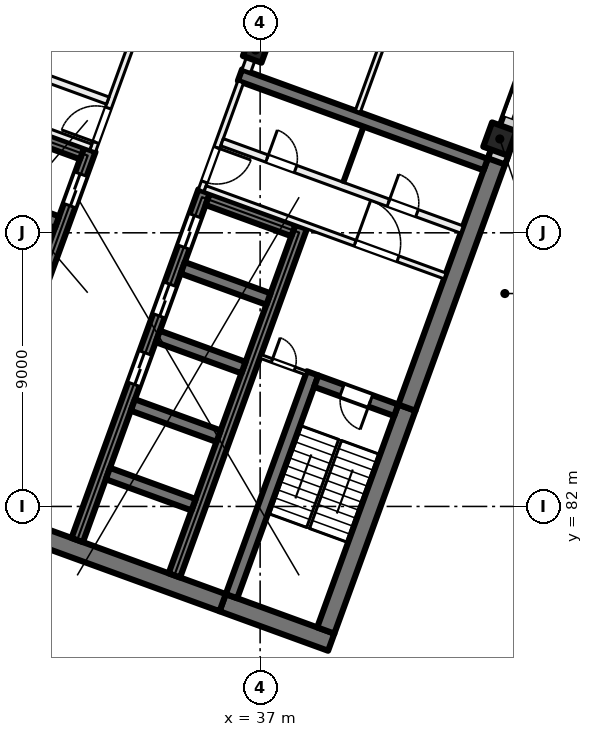
"""IFC4 building model, lengths in metres.
Left out: names, types, materials, properties, quantities, classifications, styles, units other than length and angle.
Written with IfcOpenShell. Run it as: python <this file> out.ifc"""

import sys

from ifc_helpers import new_model, si_unit, direction, frame, frame_2d, origin, origin_2d, place, context, subcontext, project, spatial, rectangle, extrude, element, fill, save


model = new_model("IFC4")
c1 = context("Model", 3, precision=1e-05, world=origin(), true_north=direction((0.0, 1.0)))
c2 = subcontext(c1, "Body", "Model", "MODEL_VIEW")
j1 = project(units=[si_unit("LENGTHUNIT", "METRE"), si_unit("PLANEANGLEUNIT", "RADIAN")], contexts=[c1])
p1 = place(None, origin())
s1 = spatial("IfcSite", under=j1, at=p1, CompositionType="ELEMENT")
p2 = place(p1, origin())
s2 = spatial("IfcBuilding", under=s1, at=p2, CompositionType="ELEMENT")
p3 = place(p2, frame((0.0, 0.0, 81.0)))
s3 = spatial("IfcBuildingStorey", under=s2, at=p3, CompositionType="ELEMENT", Elevation=81.0)
p4 = place(p3, frame((36.849, 97.011, 0.0), z_axis=(0.0, 0.0, 1.0), x_axis=(-0.342020143326, -0.939692620786, 0.0)))
e1 = element("IfcColumn", 1, at=p4, inside=s3, PredefinedType="COLUMN", context=c2, shape_type="SweptSolid", body=[
    extrude(rectangle(XDim=0.65, YDim=0.65, at=origin_2d()), origin(), (0.0, 0.0, 1.0), 4.0),
])
p5 = place(p3, frame((44.884, 94.087, 0.0), z_axis=(0.0, 0.0, 1.0), x_axis=(-0.342020143326, -0.939692620786, 0.0)))
e2 = element("IfcColumn", 2, at=p5, inside=s3, PredefinedType="COLUMN", context=c2, shape_type="SweptSolid", body=[
    extrude(rectangle(XDim=0.85, YDim=0.85, at=origin_2d()), origin(), (0.0, 0.0, 1.0), 4.0),
])
p6 = place(p3, frame((39.338, 77.535, 0.0), z_axis=(0.0, 0.0, 1.0), x_axis=(-0.939701471648, 0.341995824804, 0.0)))
e3 = element("IfcWall", 3, at=p6, inside=s3, PredefinedType="SHEAR", context=c2, shape_type="SweptSolid", body=[
    extrude(rectangle(XDim=3.8, YDim=0.6, at=frame_2d((1.9, 0.0))), origin(), (0.0, 0.0, 1.0), 4.0),
])
p7 = place(p3, frame((35.767, 78.835, 0.0), z_axis=(0.0, 0.0, 1.0), x_axis=(-0.939692894512, 0.342019391267, 0.0)))
e4 = element("IfcWall", 4, at=p7, inside=s3, PredefinedType="SHEAR", context=c2, shape_type="SweptSolid", body=[
    extrude(rectangle(XDim=14.4, YDim=0.6, at=frame_2d((7.2, 0.0))), origin(), (0.0, 0.0, 1.0), 4.0),
])
p8 = place(p3, frame((39.159, 77.92, 0.0), z_axis=(0.0, 0.0, 1.0), x_axis=(0.342016982193, 0.939693771338, 0.0)))
e5 = element("IfcWall", 5, at=p8, inside=s3, PredefinedType="SHEAR", context=c2, shape_type="SweptSolid", body=[
    extrude(rectangle(XDim=7.8, YDim=0.6, at=frame_2d((3.9, 0.0))), origin(), (0.0, 0.0, 1.0), 4.0),
])
p9 = place(p3, frame((41.827, 85.249, 0.0), z_axis=(0.0, 0.0, 1.0), x_axis=(0.342017595281, 0.939693548195, 0.0)))
e6 = element("IfcWall", 6, at=p9, inside=s3, PredefinedType="SHEAR", context=c2, shape_type="SweptSolid", body=[
    extrude(rectangle(XDim=8.925, YDim=0.6, at=frame_2d((4.462, 0.0))), origin(), (0.0, 0.0, 1.0), 4.0),
])
p10 = place(p3, frame((36.058, 79.048, 0.0), z_axis=(0.0, 0.0, 1.0), x_axis=(0.342016982193, 0.939693771338, 0.0)))
e7 = element("IfcWall", 7, at=p10, inside=s3, PredefinedType="SHEAR", context=c2, shape_type="SweptSolid", body=[
    extrude(rectangle(XDim=7.8, YDim=0.4, at=frame_2d((3.9, 0.0))), origin(), (0.0, 0.0, 1.0), 4.0),
])
p11 = place(p3, frame((41.476, 85.164, 0.0), z_axis=(0.0, 0.0, 1.0), x_axis=(-0.939678810556, 0.342058084236, 0.0)))
e8 = element("IfcWall", 8, at=p11, inside=s3, PredefinedType="SHEAR", context=c2, shape_type="SweptSolid", body=[
    extrude(rectangle(XDim=2.8, YDim=0.4, at=frame_2d((1.4, 0.0))), origin(), (0.0, 0.0, 1.0), 4.0),
])
p12 = place(p11, frame((0.9, 0.0, 0.0)))
e9 = element("IfcOpeningElement", 9, at=p12, cuts=e8, PredefinedType="OPENING", context=c2, shape_type="SweptSolid", body=[
    extrude(rectangle(XDim=1.0, YDim=2.1, at=frame_2d((0.5, 1.05))), frame((0.0, 0.21, 0.0), z_axis=(0.0, -1.0, 0.0), x_axis=(1.0, 0.0, 0.0)), (0.0, 0.0, 1.0), 0.42),
])
p13 = place(p3, frame((30.984, 80.895, 0.0), z_axis=(0.0, 0.0, 1.0), x_axis=(0.342021021735, 0.939692301071, 0.0)))
e10 = element("IfcWall", 10, at=p13, inside=s3, PredefinedType="SHEAR", context=c2, shape_type="SweptSolid", body=[
    extrude(rectangle(XDim=12.2, YDim=0.4, at=frame_2d((6.1, 0.0))), origin(), (0.0, 0.0, 1.0), 4.0),
])
p14 = place(p13, frame((5.45, 0.0, 0.0)))
e11 = element("IfcOpeningElement", 11, at=p14, cuts=e10, PredefinedType="OPENING", context=c2, shape_type="SweptSolid", body=[
    extrude(rectangle(XDim=1.1, YDim=2.1, at=frame_2d((0.55, 1.05))), frame((0.0, 0.21, 0.0), z_axis=(0.0, -1.0, 0.0), x_axis=(1.0, 0.0, 0.0)), (0.0, 0.0, 1.0), 0.42),
])
p15 = place(p13, frame((7.85, 0.0, 0.0)))
e12 = element("IfcOpeningElement", 12, at=p15, cuts=e10, PredefinedType="OPENING", context=c2, shape_type="SweptSolid", body=[
    extrude(rectangle(XDim=1.1, YDim=2.1, at=frame_2d((0.55, 1.05))), frame((0.0, 0.21, 0.0), z_axis=(0.0, -1.0, 0.0), x_axis=(1.0, 0.0, 0.0)), (0.0, 0.0, 1.0), 0.42),
])
p16 = place(p13, frame((10.25, 0.0, 0.0)))
e13 = element("IfcOpeningElement", 13, at=p16, cuts=e10, PredefinedType="OPENING", context=c2, shape_type="SweptSolid", body=[
    extrude(rectangle(XDim=1.1, YDim=2.1, at=frame_2d((0.55, 1.05))), frame((0.0, 0.21, 0.0), z_axis=(0.0, -1.0, 0.0), x_axis=(1.0, 0.0, 0.0)), (0.0, 0.0, 1.0), 0.42),
])
p17 = place(p3, frame((34.178, 79.732, 0.0), z_axis=(0.0, 0.0, 1.0), x_axis=(0.342014590177, 0.939694641948, 0.0)))
e14 = element("IfcWall", 14, at=p17, inside=s3, PredefinedType="SHEAR", context=c2, shape_type="SweptSolid", body=[
    extrude(rectangle(XDim=12.2, YDim=0.4, at=frame_2d((6.1, 0.0))), origin(), (0.0, 0.0, 1.0), 4.0),
])
for number, where, z_axis, x_axis in (
    (15, (34.812, 82.056, 0.0), (0.0, 0.0, 1.0), (-0.94, 0.342, 0.0)),
    (16, (35.632, 84.311, 0.0), (0.0, 0.0, 1.0), (-0.94, 0.342, 0.0)),
    (17, (36.453, 86.566, 0.0), (0.0, 0.0, 1.0), (-0.94, 0.342, 0.0)),
    (18, (37.274, 88.822, 0.0), (0.0, 0.0, 1.0), (-0.94, 0.342, 0.0)),
):
    element("IfcWall", number, at=place(p3, frame(where, z_axis=z_axis, x_axis=x_axis)), inside=s3, PredefinedType="SHEAR", context=c2, shape_type="SweptSolid", body=[
        extrude(rectangle(XDim=3.0, YDim=0.4, at=frame_2d((1.5, 0.0))), origin(), (0.0, 0.0, 1.0), 4.0),
    ])
p18 = place(p3, frame((38.095, 91.077, 0.0), z_axis=(0.0, 0.0, 1.0), x_axis=(-0.939676934218, 0.342063238742, 0.0)))
e19 = element("IfcWall", 19, at=p18, inside=s3, PredefinedType="SHEAR", context=c2, shape_type="SweptSolid", body=[
    extrude(rectangle(XDim=3.0, YDim=0.4, at=frame_2d((1.5, 0.0))), origin(), (0.0, 0.0, 1.0), 4.0),
])
p19 = place(p3, frame((27.225, 82.263, 0.0), z_axis=(0.0, 0.0, 1.0), x_axis=(0.342014590177, 0.939694641948, 0.0)))
e20 = element("IfcWall", 20, at=p19, inside=s3, PredefinedType="SHEAR", context=c2, shape_type="SweptSolid", body=[
    extrude(rectangle(XDim=12.2, YDim=0.4, at=frame_2d((6.1, 0.0))), origin(), (0.0, 0.0, 1.0), 4.0),
])
p20 = place(p19, frame((10.25, 0.0, 0.0)))
e21 = element("IfcOpeningElement", 21, at=p20, cuts=e20, PredefinedType="OPENING", context=c2, shape_type="SweptSolid", body=[
    extrude(rectangle(XDim=1.1, YDim=2.1, at=frame_2d((0.55, 1.05))), frame((0.0, 0.21, 0.0), z_axis=(0.0, -1.0, 0.0), x_axis=(1.0, 0.0, 0.0)), (0.0, 0.0, 1.0), 0.42),
])
p21 = place(p19, frame((0.7, 0.0, 0.0)))
e22 = element("IfcOpeningElement", 22, at=p21, cuts=e20, PredefinedType="OPENING", context=c2, shape_type="SweptSolid", body=[
    extrude(rectangle(XDim=0.8, YDim=2.1, at=frame_2d((0.4, 1.05))), frame((0.0, 0.21, 0.0), z_axis=(0.0, -1.0, 0.0), x_axis=(1.0, 0.0, 0.0)), (0.0, 0.0, 1.0), 0.42),
])
for number, where, z_axis, x_axis in (
    (23, (30.32, 91.353, 0.0), (0.0, 0.0, 1.0), (-0.94, 0.342, 0.0)),
    (24, (31.141, 93.608, 0.0), (0.0, 0.0, 1.0), (-0.94, 0.342, 0.0)),
):
    element("IfcWall", number, at=place(p3, frame(where, z_axis=z_axis, x_axis=x_axis)), inside=s3, PredefinedType="SHEAR", context=c2, shape_type="SweptSolid", body=[
        extrude(rectangle(XDim=3.0, YDim=0.4, at=frame_2d((1.5, 0.0))), origin(), (0.0, 0.0, 1.0), 4.0),
    ])
p22 = place(p3, frame((44.418, 93.245, 0.0), z_axis=(0.0, 0.0, 1.0), x_axis=(-0.93969060187, 0.342025690201, 0.0)))
e25 = element("IfcWall", 25, at=p22, inside=s3, PredefinedType="SHEAR", context=c2, shape_type="SweptSolid", body=[
    extrude(rectangle(XDim=8.6, YDim=0.4, at=frame_2d((4.3, 0.0))), origin(), (0.0, 0.0, 1.0), 4.0),
])
p23 = place(p3, frame((52.212, 113.783, 0.0), z_axis=(0.0, 0.0, 1.0), x_axis=(-0.34202521188, -0.939690775968, 0.0)))
e26 = element("IfcWall", 26, at=p23, inside=s3, PredefinedType="SOLIDWALL", context=c2, shape_type="SweptSolid", body=[
    extrude(rectangle(XDim=21.745, YDim=0.6, at=frame_2d((10.873, 0.0))), origin(), (0.0, 0.0, 1.0), 3.625),
])
p24 = place(p23, frame((4.365, 0.0, 0.0)))
e27 = element("IfcOpeningElement", 27, at=p24, cuts=e26, PredefinedType="OPENING", context=c2, shape_type="SweptSolid", body=[
    extrude(rectangle(XDim=1.8, YDim=2.4, at=frame_2d((0.9, 1.2))), frame((0.0, 0.31, 0.0), z_axis=(0.0, -1.0, 0.0), x_axis=(1.0, 0.0, 0.0)), (0.0, 0.0, 1.0), 0.62),
])
p25 = place(p23, frame((8.265, 0.0, 0.9)))
e28 = element("IfcOpeningElement", 28, at=p25, cuts=e26, PredefinedType="OPENING", context=c2, shape_type="SweptSolid", body=[
    extrude(rectangle(XDim=3.0, YDim=2.4, at=frame_2d((1.5, 1.2))), frame((0.0, 0.31, 0.0), z_axis=(0.0, -1.0, 0.0), x_axis=(1.0, 0.0, 0.0)), (0.0, 0.0, 1.0), 0.62),
])
p26 = place(p23, frame((12.765, 0.0, 0.9)))
e29 = element("IfcOpeningElement", 29, at=p26, cuts=e26, PredefinedType="OPENING", context=c2, shape_type="SweptSolid", body=[
    extrude(rectangle(XDim=3.0, YDim=2.4, at=frame_2d((1.5, 1.2))), frame((0.0, 0.31, 0.0), z_axis=(0.0, -1.0, 0.0), x_axis=(1.0, 0.0, 0.0)), (0.0, 0.0, 1.0), 0.62),
])
p27 = place(p23, frame((17.265, 0.0, 0.9)))
e30 = element("IfcOpeningElement", 30, at=p27, cuts=e26, PredefinedType="OPENING", context=c2, shape_type="SweptSolid", body=[
    extrude(rectangle(XDim=3.0, YDim=2.4, at=frame_2d((1.5, 1.2))), frame((0.0, 0.31, 0.0), z_axis=(0.0, -1.0, 0.0), x_axis=(1.0, 0.0, 0.0)), (0.0, 0.0, 1.0), 0.62),
])
p28 = place(p3, frame((31.491, 93.693, 0.0), z_axis=(0.0, 0.0, 1.0), x_axis=(0.341995824804, 0.939701471648, 0.0)))
e31 = element("IfcWall", 31, at=p28, inside=s3, PredefinedType="PARTITIONING", context=c2, shape_type="SweptSolid", body=[
    extrude(rectangle(XDim=3.8, YDim=0.2, at=frame_2d((1.9, 0.0))), origin(), (0.0, 0.0, 1.0), 3.625),
])
p29 = place(p28, frame((0.3, 0.0, 0.0)))
e32 = element("IfcOpeningElement", 32, at=p29, cuts=e31, PredefinedType="OPENING", context=c2, shape_type="SweptSolid", body=[
    extrude(rectangle(XDim=1.2, YDim=2.1, at=frame_2d((0.6, 1.05))), frame((0.0, 0.11, 0.0), z_axis=(0.0, -1.0, 0.0), x_axis=(1.0, 0.0, 0.0)), (0.0, 0.0, 1.0), 0.22),
])
p30 = place(p3, frame((23.538, 96.694, 0.0), z_axis=(0.0, 0.0, 1.0), x_axis=(0.939691552312, -0.342023078919, 0.0)))
e33 = element("IfcWall", 33, at=p30, inside=s3, PredefinedType="PARTITIONING", context=c2, shape_type="SweptSolid", body=[
    extrude(rectangle(XDim=8.4, YDim=0.2, at=frame_2d((4.2, 0.0))), origin(), (0.0, 0.0, 1.0), 3.625),
])
p31 = place(p30, frame((1.65, 0.0, 0.0)))
e34 = element("IfcOpeningElement", 34, at=p31, cuts=e33, PredefinedType="OPENING", context=c2, shape_type="SweptSolid", body=[
    extrude(rectangle(XDim=1.5, YDim=2.1, at=frame_2d((0.75, 1.05))), frame((0.0, 0.11, 0.0), z_axis=(0.0, -1.0, 0.0), x_axis=(1.0, 0.0, 0.0)), (0.0, 0.0, 1.0), 0.22),
])
p32 = place(p3, frame((24.094, 98.221, 0.0), z_axis=(0.0, 0.0, 1.0), x_axis=(0.939691552312, -0.342023078919, 0.0)))
e35 = element("IfcWall", 35, at=p32, inside=s3, PredefinedType="PARTITIONING", context=c2, shape_type="SweptSolid", body=[
    extrude(rectangle(XDim=8.4, YDim=0.25, at=frame_2d((4.2, 0.0))), origin(), (0.0, 0.0, 1.0), 3.625),
])
p33 = place(p32, frame((5.225, 0.0, 0.0)))
e36 = element("IfcOpeningElement", 36, at=p33, cuts=e35, PredefinedType="OPENING", context=c2, shape_type="SweptSolid", body=[
    extrude(rectangle(XDim=0.8, YDim=2.1, at=frame_2d((0.4, 1.05))), frame((0.0, 0.135, 0.0), z_axis=(0.0, -1.0, 0.0), x_axis=(1.0, 0.0, 0.0)), (0.0, 0.0, 1.0), 0.27),
])
p34 = place(p32, frame((0.975, 0.0, 0.0)))
e37 = element("IfcOpeningElement", 37, at=p34, cuts=e35, PredefinedType="OPENING", context=c2, shape_type="SweptSolid", body=[
    extrude(rectangle(XDim=0.8, YDim=2.1, at=frame_2d((0.4, 1.05))), frame((0.0, 0.135, 0.0), z_axis=(0.0, -1.0, 0.0), x_axis=(1.0, 0.0, 0.0)), (0.0, 0.0, 1.0), 0.27),
])
p35 = place(p3, frame((36.362, 95.964, 0.0), z_axis=(0.0, 0.0, 1.0), x_axis=(-0.341995824804, -0.939701471648, 0.0)))
e38 = element("IfcWall", 38, at=p35, inside=s3, PredefinedType="PARTITIONING", context=c2, shape_type="SweptSolid", body=[
    extrude(rectangle(XDim=3.8, YDim=0.2, at=frame_2d((1.9, 0.0))), origin(), (0.0, 0.0, 1.0), 3.625),
])
p36 = place(p35, frame((2.3, 0.0, 0.0)))
e39 = element("IfcOpeningElement", 39, at=p36, cuts=e38, PredefinedType="OPENING", context=c2, shape_type="SweptSolid", body=[
    extrude(rectangle(XDim=1.2, YDim=2.1, at=frame_2d((0.6, 1.05))), frame((0.0, 0.11, 0.0), z_axis=(0.0, -1.0, 0.0), x_axis=(1.0, 0.0, 0.0)), (0.0, 0.0, 1.0), 0.22),
])
p37 = place(p3, frame((35.19, 92.453, 0.0), z_axis=(0.0, 0.0, 1.0), x_axis=(0.939691552312, -0.342023078919, 0.0)))
e40 = element("IfcWall", 40, at=p37, inside=s3, PredefinedType="PARTITIONING", context=c2, shape_type="SweptSolid", body=[
    extrude(rectangle(XDim=8.4, YDim=0.2, at=frame_2d((4.2, 0.0))), origin(), (0.0, 0.0, 1.0), 3.625),
])
p38 = place(p37, frame((5.25, 0.0, 0.0)))
e41 = element("IfcOpeningElement", 41, at=p38, cuts=e40, PredefinedType="OPENING", context=c2, shape_type="SweptSolid", body=[
    extrude(rectangle(XDim=1.5, YDim=2.1, at=frame_2d((0.75, 1.05))), frame((0.0, 0.11, 0.0), z_axis=(0.0, -1.0, 0.0), x_axis=(1.0, 0.0, 0.0)), (0.0, 0.0, 1.0), 0.22),
])
p39 = place(p3, frame((35.746, 93.98, 0.0), z_axis=(0.0, 0.0, 1.0), x_axis=(0.939691552312, -0.342023078919, 0.0)))
e42 = element("IfcWall", 42, at=p39, inside=s3, PredefinedType="PARTITIONING", context=c2, shape_type="SweptSolid", body=[
    extrude(rectangle(XDim=8.4, YDim=0.25, at=frame_2d((4.2, 0.0))), origin(), (0.0, 0.0, 1.0), 3.625),
])
p40 = place(p39, frame((1.575, 0.0, 0.0)))
e43 = element("IfcOpeningElement", 43, at=p40, cuts=e42, PredefinedType="OPENING", context=c2, shape_type="SweptSolid", body=[
    extrude(rectangle(XDim=1.0, YDim=2.1, at=frame_2d((0.5, 1.05))), frame((0.0, 0.135, 0.0), z_axis=(0.0, -1.0, 0.0), x_axis=(1.0, 0.0, 0.0)), (0.0, 0.0, 1.0), 0.27),
])
p41 = place(p39, frame((5.825, 0.0, 0.0)))
e44 = element("IfcOpeningElement", 44, at=p41, cuts=e42, PredefinedType="OPENING", context=c2, shape_type="SweptSolid", body=[
    extrude(rectangle(XDim=1.0, YDim=2.1, at=frame_2d((0.5, 1.05))), frame((0.0, 0.135, 0.0), z_axis=(0.0, -1.0, 0.0), x_axis=(1.0, 0.0, 0.0)), (0.0, 0.0, 1.0), 0.27),
])
p42 = place(p3, frame((37.013, 86.935, 0.0), z_axis=(0.0, 0.0, 1.0), x_axis=(0.939659694648, -0.342110593602, 0.0)))
e45 = element("IfcWall", 45, at=p42, inside=s3, PredefinedType="PARTITIONING", context=c2, shape_type="SweptSolid", body=[
    extrude(rectangle(XDim=1.6, YDim=0.125, at=frame_2d((0.8, 0.0))), origin(), (0.0, 0.0, 1.0), 3.625),
])
p43 = place(p42, frame((0.4, 0.0, 0.0)))
e46 = element("IfcOpeningElement", 46, at=p43, cuts=e45, PredefinedType="OPENING", context=c2, shape_type="SweptSolid", body=[
    extrude(rectangle(XDim=0.8, YDim=2.1, at=frame_2d((0.4, 1.05))), frame((0.0, 0.073, 0.0), z_axis=(0.0, -1.0, 0.0), x_axis=(1.0, 0.0, 0.0)), (0.0, 0.0, 1.0), 0.145),
])
p44 = place(p3, frame((40.403, 94.494, 0.0), z_axis=(0.0, 0.0, 1.0), x_axis=(-0.342064742067, -0.939676386973, 0.0)))
e47 = element("IfcWall", 47, at=p44, inside=s3, PredefinedType="PARTITIONING", context=c2, shape_type="SweptSolid", body=[
    extrude(rectangle(XDim=1.95, YDim=0.1, at=frame_2d((0.975, 0.0))), origin(), (0.0, 0.0, 1.0), 3.625),
])
p45 = place(p3, frame((42.036, 100.005, 0.0), z_axis=(0.0, 0.0, 1.0), x_axis=(-0.341908323648, -0.939733312286, 0.0)))
e48 = element("IfcWall", 48, at=p45, inside=s3, PredefinedType="PARTITIONING", context=c2, shape_type="SweptSolid", body=[
    extrude(rectangle(XDim=5.338, YDim=0.175, at=frame_2d((2.669, 0.0))), origin(), (0.0, 0.0, 1.0), 3.625),
])
p46 = place(p3, frame((47.314, 125.909, 0.0), z_axis=(0.0, 0.0, 1.0), x_axis=(-0.342010770371, -0.939696032209, 0.0)))
e49 = element("IfcWall", 49, at=p46, inside=s3, PredefinedType="PARTITIONING", context=c2, shape_type="SweptSolid", body=[
    extrude(rectangle(XDim=31.485, YDim=0.3, at=frame_2d((15.742, 0.0))), origin(), (0.0, 0.0, 1.0), 3.625),
])
p47 = place(p46, frame((28.259, 0.0, 0.0)))
e50 = element("IfcOpeningElement", 50, at=p47, cuts=e49, PredefinedType="OPENING", context=c2, shape_type="SweptSolid", body=[
    extrude(rectangle(XDim=1.2, YDim=2.1, at=frame_2d((0.6, 1.05))), frame((0.0, 0.16, 0.0), z_axis=(0.0, -1.0, 0.0), x_axis=(1.0, 0.0, 0.0)), (0.0, 0.0, 1.0), 0.32),
])
p48 = place(p46, frame((18.584, 0.0, 0.0)))
e51 = element("IfcOpeningElement", 51, at=p48, cuts=e49, PredefinedType="OPENING", context=c2, shape_type="SweptSolid", body=[
    extrude(rectangle(XDim=1.8, YDim=2.1, at=frame_2d((0.9, 1.05))), frame((0.0, 0.16, 0.0), z_axis=(0.0, -1.0, 0.0), x_axis=(1.0, 0.0, 0.0)), (0.0, 0.0, 1.0), 0.32),
])
p49 = place(p46, frame((9.985, 0.0, 0.0)))
e52 = element("IfcOpeningElement", 52, at=p49, cuts=e49, PredefinedType="OPENING", context=c2, shape_type="SweptSolid", body=[
    extrude(rectangle(XDim=1.0, YDim=2.1, at=frame_2d((0.5, 1.05))), frame((0.0, 0.16, 0.0), z_axis=(0.0, -1.0, 0.0), x_axis=(1.0, 0.0, 0.0)), (0.0, 0.0, 1.0), 0.32),
])
p50 = place(p46, frame((5.484, 0.0, 0.0)))
e53 = element("IfcOpeningElement", 53, at=p50, cuts=e49, PredefinedType="OPENING", context=c2, shape_type="SweptSolid", body=[
    extrude(rectangle(XDim=1.0, YDim=2.1, at=frame_2d((0.5, 1.05))), frame((0.0, 0.16, 0.0), z_axis=(0.0, -1.0, 0.0), x_axis=(1.0, 0.0, 0.0)), (0.0, 0.0, 1.0), 0.32),
])
p51 = place(p27, origin())
e54 = element("IfcWindow", 54, at=p51, inside=s3, PartitioningType="SINGLE_PANEL", PredefinedType="WINDOW", context=c2, shape_type="SweptSolid", body=[
    extrude(rectangle(XDim=3.0, YDim=2.4, at=frame_2d((1.5, 1.2))), frame((0.0, 0.03, 0.0), z_axis=(0.0, -1.0, 0.0), x_axis=(1.0, 0.0, 0.0)), (0.0, 0.0, 1.0), 0.06),
])
fill(e30, e54)
p52 = place(p20, origin())
e55 = element("IfcDoor", 55, at=p52, inside=s3, OperationType="DOUBLE_DOOR_SLIDING", PredefinedType="DOOR", context=c2, shape_type="SweptSolid", body=[
    extrude(rectangle(XDim=1.1, YDim=2.1, at=frame_2d((0.55, 1.05))), frame((0.0, 0.025, 0.0), z_axis=(0.0, -1.0, 0.0), x_axis=(1.0, 0.0, 0.0)), (0.0, 0.0, 1.0), 0.05),
])
fill(e21, e55)
p53 = place(p14, origin())
e56 = element("IfcDoor", 56, at=p53, inside=s3, OperationType="DOUBLE_DOOR_SLIDING", PredefinedType="DOOR", context=c2, shape_type="SweptSolid", body=[
    extrude(rectangle(XDim=1.1, YDim=2.1, at=frame_2d((0.55, 1.05))), frame((0.0, 0.025, 0.0), z_axis=(0.0, -1.0, 0.0), x_axis=(1.0, 0.0, 0.0)), (0.0, 0.0, 1.0), 0.05),
])
fill(e11, e56)
p54 = place(p15, origin())
e57 = element("IfcDoor", 57, at=p54, inside=s3, OperationType="DOUBLE_DOOR_SLIDING", PredefinedType="DOOR", context=c2, shape_type="SweptSolid", body=[
    extrude(rectangle(XDim=1.1, YDim=2.1, at=frame_2d((0.55, 1.05))), frame((0.0, 0.025, 0.0), z_axis=(0.0, -1.0, 0.0), x_axis=(1.0, 0.0, 0.0)), (0.0, 0.0, 1.0), 0.05),
])
fill(e12, e57)
p55 = place(p16, origin())
e58 = element("IfcDoor", 58, at=p55, inside=s3, OperationType="DOUBLE_DOOR_SLIDING", PredefinedType="DOOR", context=c2, shape_type="SweptSolid", body=[
    extrude(rectangle(XDim=1.1, YDim=2.1, at=frame_2d((0.55, 1.05))), frame((0.0, 0.025, 0.0), z_axis=(0.0, -1.0, 0.0), x_axis=(1.0, 0.0, 0.0)), (0.0, 0.0, 1.0), 0.05),
])
fill(e13, e58)
p56 = place(p29, origin())
e59 = element("IfcDoor", 59, at=p56, inside=s3, OperationType="DOUBLE_DOOR_SINGLE_SWING", PredefinedType="DOOR", context=c2, shape_type="SweptSolid", body=[
    extrude(rectangle(XDim=1.2, YDim=2.1, at=frame_2d((0.6, 1.05))), frame((0.0, 0.025, 0.0), z_axis=(0.0, -1.0, 0.0), x_axis=(1.0, 0.0, 0.0)), (0.0, 0.0, 1.0), 0.05),
])
fill(e32, e59)
p57 = place(p36, origin())
e60 = element("IfcDoor", 60, at=p57, inside=s3, OperationType="DOUBLE_DOOR_SINGLE_SWING", PredefinedType="DOOR", context=c2, shape_type="SweptSolid", body=[
    extrude(rectangle(XDim=1.2, YDim=2.1, at=frame_2d((0.6, 1.05))), frame((0.0, 0.025, 0.0), z_axis=(0.0, -1.0, 0.0), x_axis=(1.0, 0.0, 0.0)), (0.0, 0.0, 1.0), 0.05),
])
fill(e39, e60)
p58 = place(p38, origin())
e61 = element("IfcDoor", 61, at=p58, inside=s3, OperationType="DOUBLE_DOOR_SINGLE_SWING", PredefinedType="DOOR", context=c2, shape_type="SweptSolid", body=[
    extrude(rectangle(XDim=1.5, YDim=2.1, at=frame_2d((0.75, 1.05))), frame((0.0, 0.025, 0.0), z_axis=(0.0, -1.0, 0.0), x_axis=(1.0, 0.0, 0.0)), (0.0, 0.0, 1.0), 0.05),
])
fill(e41, e61)
p59 = place(p12, origin())
e62 = element("IfcDoor", 62, at=p59, inside=s3, OperationType="SINGLE_SWING_RIGHT", PredefinedType="DOOR", context=c2, shape_type="SweptSolid", body=[
    extrude(rectangle(XDim=1.0, YDim=2.1, at=frame_2d((0.5, 1.05))), frame((0.0, 0.025, 0.0), z_axis=(0.0, -1.0, 0.0), x_axis=(1.0, 0.0, 0.0)), (0.0, 0.0, 1.0), 0.05),
])
fill(e9, e62)
p60 = place(p43, origin())
e63 = element("IfcDoor", 63, at=p60, inside=s3, OperationType="SINGLE_SWING_LEFT", PredefinedType="DOOR", context=c2, shape_type="SweptSolid", body=[
    extrude(rectangle(XDim=0.8, YDim=2.1, at=frame_2d((0.4, 1.05))), frame((0.0, 0.025, 0.0), z_axis=(0.0, -1.0, 0.0), x_axis=(1.0, 0.0, 0.0)), (0.0, 0.0, 1.0), 0.05),
])
fill(e46, e63)
p61 = place(p40, origin())
e64 = element("IfcDoor", 64, at=p61, inside=s3, OperationType="SINGLE_SWING_RIGHT", PredefinedType="DOOR", context=c2, shape_type="SweptSolid", body=[
    extrude(rectangle(XDim=1.0, YDim=2.1, at=frame_2d((0.5, 1.05))), frame((0.0, 0.025, 0.0), z_axis=(0.0, -1.0, 0.0), x_axis=(1.0, 0.0, 0.0)), (0.0, 0.0, 1.0), 0.05),
])
fill(e43, e64)
p62 = place(p41, origin())
e65 = element("IfcDoor", 65, at=p62, inside=s3, OperationType="SINGLE_SWING_LEFT", PredefinedType="DOOR", context=c2, shape_type="SweptSolid", body=[
    extrude(rectangle(XDim=1.0, YDim=2.1, at=frame_2d((0.5, 1.05))), frame((0.0, 0.025, 0.0), z_axis=(0.0, -1.0, 0.0), x_axis=(1.0, 0.0, 0.0)), (0.0, 0.0, 1.0), 0.05),
])
fill(e44, e65)
save(model, sys.argv[1])
